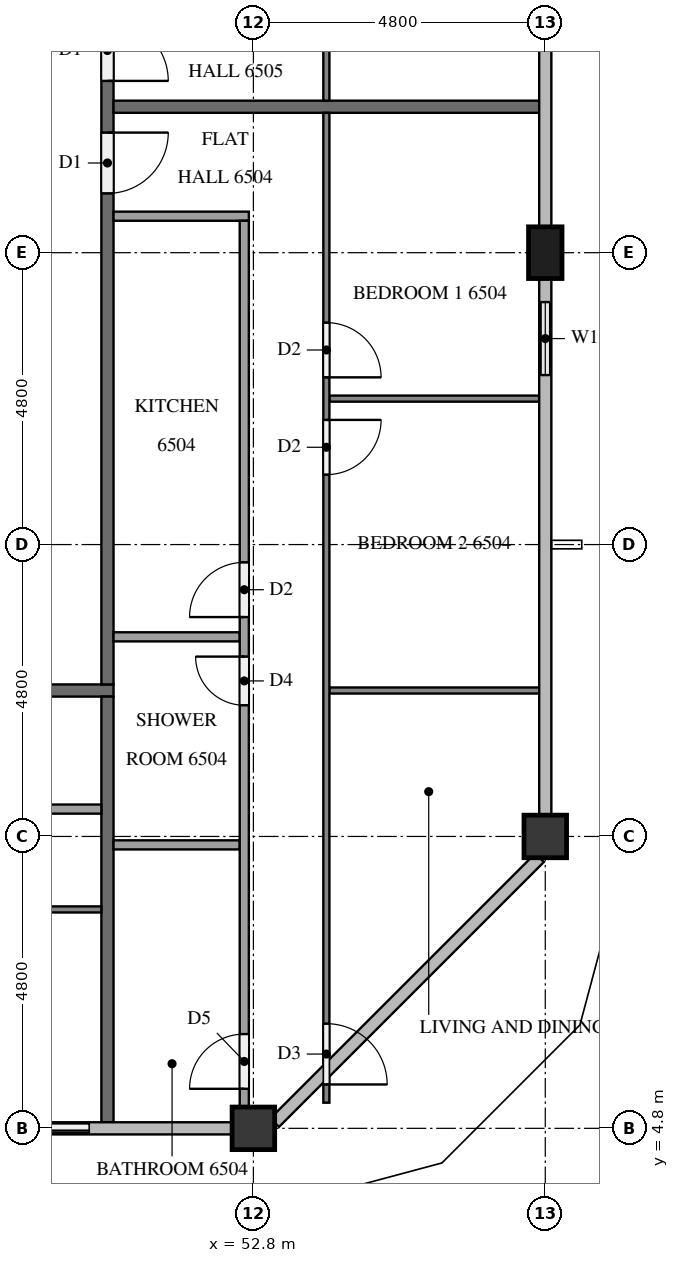
"""IFC4 building model, lengths in metres.
Left out: names, types, materials, properties, quantities, classifications, styles, units other than length and angle.
Written with IfcOpenShell. Run it as: python <this file> out.ifc"""

import sys

from ifc_helpers import new_model, si_unit, direction, frame, frame_2d, origin, origin_2d, place, context, subcontext, project, spatial, rectangle, extrude, element, fill, save


model = new_model("IFC4")
c1 = context("Model", 3, precision=1e-05, world=origin(), true_north=direction((0.0, 1.0)))
c2 = subcontext(c1, "Body", "Model", "MODEL_VIEW")
j1 = project(units=[si_unit("LENGTHUNIT", "METRE"), si_unit("PLANEANGLEUNIT", "RADIAN")], contexts=[c1])
p1 = place(None, origin())
s1 = spatial("IfcSite", under=j1, at=p1, CompositionType="ELEMENT")
p2 = place(p1, origin())
s2 = spatial("IfcBuilding", under=s1, at=p2, CompositionType="ELEMENT")
p3 = place(p2, frame((0.0, 0.0, 249.2)))
s3 = spatial("IfcBuildingStorey", under=s2, at=p3, CompositionType="ELEMENT", Elevation=249.2)
for number, where, z_axis, x_axis in (
    (1, (52.8, 4.8, 0.0), (0.0, 0.0, 1.0), (1.0, 0.0, 0.0)),
    (2, (57.6, 9.6, 0.0), (0.0, 0.0, 1.0), (1.0, 0.0, 0.0)),
):
    element("IfcColumn", number, at=place(p3, frame(where, z_axis=z_axis, x_axis=x_axis)), inside=s3, PredefinedType="COLUMN", context=c2, shape_type="SweptSolid", body=[
        extrude(rectangle(XDim=0.7, YDim=0.7, at=origin_2d()), origin(), (0.0, 0.0, 1.0), 3.2),
    ])
p4 = place(p3, frame((57.6, 19.2, 0.0), z_axis=(0.0, 0.0, 1.0), x_axis=(0.0, 1.0, 0.0)))
e3 = element("IfcColumn", 3, at=p4, inside=s3, PredefinedType="COLUMN", context=c2, shape_type="SweptSolid", body=[
    extrude(rectangle(XDim=0.85, YDim=0.55, at=origin_2d()), origin(), (0.0, 0.0, 1.0), 3.2),
])
p5 = place(p3, frame((48.0, 4.8, 0.0), z_axis=(0.0, 0.0, 1.0), x_axis=(1.0, 0.0, 0.0)))
e4 = element("IfcWall", 4, at=p5, inside=s3, PredefinedType="SOLIDWALL", context=c2, shape_type="SweptSolid", body=[
    extrude(rectangle(XDim=2.4, YDim=0.15, at=frame_2d((1.2, 0.0))), origin(), (0.0, 0.0, 1.0), 3.2),
])
p6 = place(p5, frame((0.3, 0.0, 0.0)))
e5 = element("IfcOpeningElement", 5, at=p6, cuts=e4, PredefinedType="OPENING", context=c2, shape_type="SweptSolid", body=[
    extrude(rectangle(XDim=1.8, YDim=2.4, at=frame_2d((0.9, 1.2))), frame((0.0, 0.085, 0.0), z_axis=(0.0, -1.0, 0.0), x_axis=(1.0, 0.0, 0.0)), (0.0, 0.0, 1.0), 0.17),
])
p7 = place(p3, frame((57.6, 16.8, 0.0), z_axis=(0.0, 0.0, 1.0), x_axis=(0.0, 1.0, 0.0)))
e6 = element("IfcWall", 6, at=p7, inside=s3, PredefinedType="SOLIDWALL", context=c2, shape_type="SweptSolid", body=[
    extrude(rectangle(XDim=1.975, YDim=0.15, at=frame_2d((0.987, 0.0))), origin(), (0.0, 0.0, 1.0), 3.2),
])
p8 = place(p7, frame((0.387, 0.0, 0.9)))
e7 = element("IfcOpeningElement", 7, at=p8, cuts=e6, PredefinedType="OPENING", context=c2, shape_type="SweptSolid", body=[
    extrude(rectangle(XDim=1.2, YDim=1.4, at=frame_2d((0.6, 0.7))), frame((0.0, 0.085, 0.0), z_axis=(0.0, -1.0, 0.0), x_axis=(1.0, 0.0, 0.0)), (0.0, 0.0, 1.0), 0.17),
])
p9 = place(p3, frame((50.5, 12.0, 0.0), z_axis=(0.0, 0.0, 1.0), x_axis=(-1.0, 0.0, 0.0)))
e8 = element("IfcWall", 8, at=p9, inside=s3, PredefinedType="PARTITIONING", context=c2, shape_type="SweptSolid", body=[
    extrude(rectangle(XDim=38.6, YDim=0.2, at=frame_2d((19.3, 0.0))), origin(), (0.0, 0.0, 1.0), 3.2),
])
p10 = place(p9, frame((37.075, 0.0, 0.0)))
e9 = element("IfcOpeningElement", 9, at=p10, cuts=e8, PredefinedType="OPENING", context=c2, shape_type="SweptSolid", body=[
    extrude(rectangle(XDim=1.0, YDim=2.1, at=frame_2d((0.5, 1.05))), frame((0.0, 0.11, 0.0), z_axis=(0.0, -1.0, 0.0), x_axis=(1.0, 0.0, 0.0)), (0.0, 0.0, 1.0), 0.22),
])
p11 = place(p9, frame((12.525, 0.0, 0.0)))
e10 = element("IfcOpeningElement", 10, at=p11, cuts=e8, PredefinedType="OPENING", context=c2, shape_type="SweptSolid", body=[
    extrude(rectangle(XDim=1.0, YDim=2.1, at=frame_2d((0.5, 1.05))), frame((0.0, 0.11, 0.0), z_axis=(0.0, -1.0, 0.0), x_axis=(1.0, 0.0, 0.0)), (0.0, 0.0, 1.0), 0.22),
])
p12 = place(p9, frame((10.675, 0.0, 0.0)))
e11 = element("IfcOpeningElement", 11, at=p12, cuts=e8, PredefinedType="OPENING", context=c2, shape_type="SweptSolid", body=[
    extrude(rectangle(XDim=1.0, YDim=2.1, at=frame_2d((0.5, 1.05))), frame((0.0, 0.11, 0.0), z_axis=(0.0, -1.0, 0.0), x_axis=(1.0, 0.0, 0.0)), (0.0, 0.0, 1.0), 0.22),
])
p13 = place(p3, frame((50.4, 40.7, 0.0), z_axis=(0.0, 0.0, 1.0), x_axis=(0.0, -1.0, 0.0)))
e12 = element("IfcWall", 12, at=p13, inside=s3, PredefinedType="PARTITIONING", context=c2, shape_type="SweptSolid", body=[
    extrude(rectangle(XDim=28.6, YDim=0.2, at=frame_2d((14.3, 0.0))), origin(), (0.0, 0.0, 1.0), 3.2),
])
p14 = place(p13, frame((19.525, 0.0, 0.0)))
e13 = element("IfcOpeningElement", 13, at=p14, cuts=e12, PredefinedType="OPENING", context=c2, shape_type="SweptSolid", body=[
    extrude(rectangle(XDim=1.0, YDim=2.1, at=frame_2d((0.5, 1.05))), frame((0.0, 0.11, 0.0), z_axis=(0.0, -1.0, 0.0), x_axis=(1.0, 0.0, 0.0)), (0.0, 0.0, 1.0), 0.22),
])
p15 = place(p13, frame((17.675, 0.0, 0.0)))
e14 = element("IfcOpeningElement", 14, at=p15, cuts=e12, PredefinedType="OPENING", context=c2, shape_type="SweptSolid", body=[
    extrude(rectangle(XDim=1.0, YDim=2.1, at=frame_2d((0.5, 1.05))), frame((0.0, 0.11, 0.0), z_axis=(0.0, -1.0, 0.0), x_axis=(1.0, 0.0, 0.0)), (0.0, 0.0, 1.0), 0.22),
])
p16 = place(p13, frame((0.325, 0.0, 0.0)))
e15 = element("IfcOpeningElement", 15, at=p16, cuts=e12, PredefinedType="OPENING", context=c2, shape_type="SweptSolid", body=[
    extrude(rectangle(XDim=1.0, YDim=2.1, at=frame_2d((0.5, 1.05))), frame((0.0, 0.11, 0.0), z_axis=(0.0, -1.0, 0.0), x_axis=(1.0, 0.0, 0.0)), (0.0, 0.0, 1.0), 0.22),
])
for number, where, z_axis, x_axis in (
    (16, (50.4, 11.9, 0.0), (0.0, 0.0, 1.0), (0.0, -1.0, 0.0)),
    (17, (50.5, 21.6, 0.0), (0.0, 0.0, 1.0), (1.0, 0.0, 0.0)),
):
    element("IfcWall", number, at=place(p3, frame(where, z_axis=z_axis, x_axis=x_axis)), inside=s3, PredefinedType="PARTITIONING", context=c2, shape_type="SweptSolid", body=[
        extrude(rectangle(XDim=7.0, YDim=0.2, at=frame_2d((3.5, 0.0))), origin(), (0.0, 0.0, 1.0), 3.2),
    ])
p17 = place(p3, frame((50.3, 8.4, 0.0), z_axis=(0.0, 0.0, 1.0), x_axis=(-1.0, 0.0, 0.0)))
e18 = element("IfcWall", 18, at=p17, inside=s3, PredefinedType="PARTITIONING", context=c2, shape_type="SweptSolid", body=[
    extrude(rectangle(XDim=11.8, YDim=0.1, at=frame_2d((5.9, 0.0))), origin(), (0.0, 0.0, 1.0), 3.2),
])
p18 = place(p17, frame((7.45, 0.0, 0.0)))
e19 = element("IfcOpeningElement", 19, at=p18, cuts=e18, PredefinedType="OPENING", context=c2, shape_type="SweptSolid", body=[
    extrude(rectangle(XDim=0.9, YDim=2.1, at=frame_2d((0.45, 1.05))), frame((0.0, 0.06, 0.0), z_axis=(0.0, -1.0, 0.0), x_axis=(1.0, 0.0, 0.0)), (0.0, 0.0, 1.0), 0.12),
])
p19 = place(p17, frame((5.75, 0.0, 0.0)))
e20 = element("IfcOpeningElement", 20, at=p19, cuts=e18, PredefinedType="OPENING", context=c2, shape_type="SweptSolid", body=[
    extrude(rectangle(XDim=1.0, YDim=2.1, at=frame_2d((0.5, 1.05))), frame((0.0, 0.06, 0.0), z_axis=(0.0, -1.0, 0.0), x_axis=(1.0, 0.0, 0.0)), (0.0, 0.0, 1.0), 0.12),
])
p20 = place(p3, frame((40.275, 10.05, 0.0), z_axis=(0.0, 0.0, 1.0), x_axis=(1.0, 0.0, 0.0)))
e21 = element("IfcWall", 21, at=p20, inside=s3, PredefinedType="PARTITIONING", context=c2, shape_type="SweptSolid", body=[
    extrude(rectangle(XDim=10.025, YDim=0.15, at=frame_2d((5.013, 0.0))), origin(), (0.0, 0.0, 1.0), 3.2),
])
p21 = place(p20, frame((2.885, 0.0, 0.0)))
e22 = element("IfcOpeningElement", 22, at=p21, cuts=e21, PredefinedType="OPENING", context=c2, shape_type="SweptSolid", body=[
    extrude(rectangle(XDim=0.8, YDim=2.1, at=frame_2d((0.4, 1.05))), frame((0.0, 0.085, 0.0), z_axis=(0.0, -1.0, 0.0), x_axis=(1.0, 0.0, 0.0)), (0.0, 0.0, 1.0), 0.17),
])
p22 = place(p20, frame((4.335, 0.0, 0.0)))
e23 = element("IfcOpeningElement", 23, at=p22, cuts=e21, PredefinedType="OPENING", context=c2, shape_type="SweptSolid", body=[
    extrude(rectangle(XDim=0.9, YDim=2.1, at=frame_2d((0.45, 1.05))), frame((0.0, 0.085, 0.0), z_axis=(0.0, -1.0, 0.0), x_axis=(1.0, 0.0, 0.0)), (0.0, 0.0, 1.0), 0.17),
])
for number, where, z_axis, x_axis in (
    (24, (54.05, 16.8, 0.0), (0.0, 0.0, 1.0), (1.0, 0.0, 0.0)),
    (25, (54.05, 12.0, 0.0), (0.0, 0.0, 1.0), (1.0, 0.0, 0.0)),
):
    element("IfcWall", number, at=place(p3, frame(where, z_axis=z_axis, x_axis=x_axis)), inside=s3, PredefinedType="PARTITIONING", context=c2, shape_type="SweptSolid", body=[
        extrude(rectangle(XDim=3.45, YDim=0.1, at=frame_2d((1.725, 0.0))), origin(), (0.0, 0.0, 1.0), 3.2),
    ])
p23 = place(p3, frame((54.0, 21.5, 0.0), z_axis=(0.0, 0.0, 1.0), x_axis=(0.0, -1.0, 0.0)))
e26 = element("IfcWall", 26, at=p23, inside=s3, PredefinedType="PARTITIONING", context=c2, shape_type="SweptSolid", body=[
    extrude(rectangle(XDim=16.279, YDim=0.1, at=frame_2d((8.139, 0.0))), origin(), (0.0, 0.0, 1.0), 3.2),
])
p24 = place(p23, frame((3.45, 0.0, 0.0)))
e27 = element("IfcOpeningElement", 27, at=p24, cuts=e26, PredefinedType="OPENING", context=c2, shape_type="SweptSolid", body=[
    extrude(rectangle(XDim=0.9, YDim=2.1, at=frame_2d((0.45, 1.05))), frame((0.0, 0.06, 0.0), z_axis=(0.0, -1.0, 0.0), x_axis=(1.0, 0.0, 0.0)), (0.0, 0.0, 1.0), 0.12),
])
p25 = place(p23, frame((5.05, 0.0, 0.0)))
e28 = element("IfcOpeningElement", 28, at=p25, cuts=e26, PredefinedType="OPENING", context=c2, shape_type="SweptSolid", body=[
    extrude(rectangle(XDim=0.9, YDim=2.1, at=frame_2d((0.45, 1.05))), frame((0.0, 0.06, 0.0), z_axis=(0.0, -1.0, 0.0), x_axis=(1.0, 0.0, 0.0)), (0.0, 0.0, 1.0), 0.12),
])
p26 = place(p23, frame((14.979, 0.0, 0.0)))
e29 = element("IfcOpeningElement", 29, at=p26, cuts=e26, PredefinedType="OPENING", context=c2, shape_type="SweptSolid", body=[
    extrude(rectangle(XDim=1.0, YDim=2.1, at=frame_2d((0.5, 1.05))), frame((0.0, 0.06, 0.0), z_axis=(0.0, -1.0, 0.0), x_axis=(1.0, 0.0, 0.0)), (0.0, 0.0, 1.0), 0.12),
])
for number, where, z_axis, x_axis in (
    (30, (50.5, 12.883, 0.0), (0.0, 0.0, 1.0), (1.0, 0.0, 0.0)),
    (31, (50.5, 9.461, 0.0), (0.0, 0.0, 1.0), (1.0, 0.0, 0.0)),
):
    element("IfcWall", number, at=place(p3, frame(where, z_axis=z_axis, x_axis=x_axis)), inside=s3, PredefinedType="PARTITIONING", context=c2, shape_type="SweptSolid", body=[
        extrude(rectangle(XDim=2.075, YDim=0.15, at=frame_2d((1.038, 0.0))), origin(), (0.0, 0.0, 1.0), 3.2),
    ])
p27 = place(p3, frame((50.5, 19.8, 0.0), z_axis=(0.0, 0.0, 1.0), x_axis=(1.0, 0.0, 0.0)))
e32 = element("IfcWall", 32, at=p27, inside=s3, PredefinedType="PARTITIONING", context=c2, shape_type="SweptSolid", body=[
    extrude(rectangle(XDim=2.225, YDim=0.15, at=frame_2d((1.113, 0.0))), origin(), (0.0, 0.0, 1.0), 3.2),
])
p28 = place(p3, frame((52.65, 5.15, 0.0), z_axis=(0.0, 0.0, 1.0), x_axis=(0.0, 1.0, 0.0)))
e33 = element("IfcWall", 33, at=p28, inside=s3, PredefinedType="PARTITIONING", context=c2, shape_type="SweptSolid", body=[
    extrude(rectangle(XDim=14.575, YDim=0.15, at=frame_2d((7.288, 0.0))), origin(), (0.0, 0.0, 1.0), 3.2),
])
p29 = place(p28, frame((8.058, 0.0, 0.0)))
e34 = element("IfcOpeningElement", 34, at=p29, cuts=e33, PredefinedType="OPENING", context=c2, shape_type="SweptSolid", body=[
    extrude(rectangle(XDim=0.9, YDim=2.1, at=frame_2d((0.45, 1.05))), frame((0.0, 0.085, 0.0), z_axis=(0.0, -1.0, 0.0), x_axis=(1.0, 0.0, 0.0)), (0.0, 0.0, 1.0), 0.17),
])
p30 = place(p28, frame((6.608, 0.0, 0.0)))
e35 = element("IfcOpeningElement", 35, at=p30, cuts=e33, PredefinedType="OPENING", context=c2, shape_type="SweptSolid", body=[
    extrude(rectangle(XDim=0.8, YDim=2.1, at=frame_2d((0.4, 1.05))), frame((0.0, 0.085, 0.0), z_axis=(0.0, -1.0, 0.0), x_axis=(1.0, 0.0, 0.0)), (0.0, 0.0, 1.0), 0.17),
])
p31 = place(p28, frame((0.3, 0.0, 0.0)))
e36 = element("IfcOpeningElement", 36, at=p31, cuts=e33, PredefinedType="OPENING", context=c2, shape_type="SweptSolid", body=[
    extrude(rectangle(XDim=0.9, YDim=2.1, at=frame_2d((0.45, 1.05))), frame((0.0, 0.085, 0.0), z_axis=(0.0, -1.0, 0.0), x_axis=(1.0, 0.0, 0.0)), (0.0, 0.0, 1.0), 0.17),
])
p32 = place(p3, frame((54.0, 31.1, 0.0), z_axis=(0.0, 0.0, 1.0), x_axis=(0.0, -1.0, 0.0)))
e37 = element("IfcWall", 37, at=p32, inside=s3, PredefinedType="PARTITIONING", context=c2, shape_type="SweptSolid", body=[
    extrude(rectangle(XDim=9.4, YDim=0.1, at=frame_2d((4.7, 0.0))), origin(), (0.0, 0.0, 1.0), 3.2),
])
p33 = place(p32, frame((5.05, 0.0, 0.0)))
e38 = element("IfcOpeningElement", 38, at=p33, cuts=e37, PredefinedType="OPENING", context=c2, shape_type="SweptSolid", body=[
    extrude(rectangle(XDim=1.0, YDim=2.1, at=frame_2d((0.5, 1.05))), frame((0.0, 0.06, 0.0), z_axis=(0.0, -1.0, 0.0), x_axis=(1.0, 0.0, 0.0)), (0.0, 0.0, 1.0), 0.12),
])
p34 = place(p32, frame((3.45, 0.0, 0.0)))
e39 = element("IfcOpeningElement", 39, at=p34, cuts=e37, PredefinedType="OPENING", context=c2, shape_type="SweptSolid", body=[
    extrude(rectangle(XDim=0.9, YDim=2.1, at=frame_2d((0.45, 1.05))), frame((0.0, 0.06, 0.0), z_axis=(0.0, -1.0, 0.0), x_axis=(1.0, 0.0, 0.0)), (0.0, 0.0, 1.0), 0.12),
])
p35 = place(p6, origin())
e40 = element("IfcDoor", 40, at=p35, inside=s3, OperationType="SLIDING_TO_RIGHT", PredefinedType="DOOR", context=c2, shape_type="SweptSolid", body=[
    extrude(rectangle(XDim=1.8, YDim=2.4, at=frame_2d((0.9, 1.2))), frame((0.0, 0.025, 0.0), z_axis=(0.0, -1.0, 0.0), x_axis=(1.0, 0.0, 0.0)), (0.0, 0.0, 1.0), 0.05),
])
fill(e5, e40)
p36 = place(p8, origin())
e41 = element("IfcWindow", 41, at=p36, inside=s3, PartitioningType="SINGLE_PANEL", PredefinedType="WINDOW", context=c2, shape_type="SweptSolid", body=[
    extrude(rectangle(XDim=1.2, YDim=1.4, at=frame_2d((0.6, 0.7))), frame((0.0, 0.03, 0.0), z_axis=(0.0, -1.0, 0.0), x_axis=(1.0, 0.0, 0.0)), (0.0, 0.0, 1.0), 0.06),
])
fill(e7, e41)
p37 = place(p14, origin())
e42 = element("IfcDoor", 42, at=p37, inside=s3, OperationType="SINGLE_SWING_LEFT", PredefinedType="DOOR", context=c2, shape_type="SweptSolid", body=[
    extrude(rectangle(XDim=1.0, YDim=2.1, at=frame_2d((0.5, 1.05))), frame((0.0, 0.025, 0.0), z_axis=(0.0, -1.0, 0.0), x_axis=(1.0, 0.0, 0.0)), (0.0, 0.0, 1.0), 0.05),
])
fill(e13, e42)
p38 = place(p15, origin())
e43 = element("IfcDoor", 43, at=p38, inside=s3, OperationType="SINGLE_SWING_RIGHT", PredefinedType="DOOR", context=c2, shape_type="SweptSolid", body=[
    extrude(rectangle(XDim=1.0, YDim=2.1, at=frame_2d((0.5, 1.05))), frame((0.0, 0.025, 0.0), z_axis=(0.0, -1.0, 0.0), x_axis=(1.0, 0.0, 0.0)), (0.0, 0.0, 1.0), 0.05),
])
fill(e14, e43)
p39 = place(p24, origin())
e44 = element("IfcDoor", 44, at=p39, inside=s3, OperationType="SINGLE_SWING_RIGHT", PredefinedType="DOOR", context=c2, shape_type="SweptSolid", body=[
    extrude(rectangle(XDim=0.9, YDim=2.1, at=frame_2d((0.45, 1.05))), frame((0.0, 0.025, 0.0), z_axis=(0.0, -1.0, 0.0), x_axis=(1.0, 0.0, 0.0)), (0.0, 0.0, 1.0), 0.05),
])
fill(e27, e44)
p40 = place(p25, origin())
e45 = element("IfcDoor", 45, at=p40, inside=s3, OperationType="SINGLE_SWING_LEFT", PredefinedType="DOOR", context=c2, shape_type="SweptSolid", body=[
    extrude(rectangle(XDim=0.9, YDim=2.1, at=frame_2d((0.45, 1.05))), frame((0.0, 0.025, 0.0), z_axis=(0.0, -1.0, 0.0), x_axis=(1.0, 0.0, 0.0)), (0.0, 0.0, 1.0), 0.05),
])
fill(e28, e45)
p41 = place(p26, origin())
e46 = element("IfcDoor", 46, at=p41, inside=s3, OperationType="SINGLE_SWING_RIGHT", PredefinedType="DOOR", context=c2, shape_type="SweptSolid", body=[
    extrude(rectangle(XDim=1.0, YDim=2.1, at=frame_2d((0.5, 1.05))), frame((0.0, 0.025, 0.0), z_axis=(0.0, -1.0, 0.0), x_axis=(1.0, 0.0, 0.0)), (0.0, 0.0, 1.0), 0.05),
])
fill(e29, e46)
p42 = place(p29, origin())
e47 = element("IfcDoor", 47, at=p42, inside=s3, OperationType="SINGLE_SWING_LEFT", PredefinedType="DOOR", context=c2, shape_type="SweptSolid", body=[
    extrude(rectangle(XDim=0.9, YDim=2.1, at=frame_2d((0.45, 1.05))), frame((0.0, 0.025, 0.0), z_axis=(0.0, -1.0, 0.0), x_axis=(1.0, 0.0, 0.0)), (0.0, 0.0, 1.0), 0.05),
])
fill(e34, e47)
p43 = place(p30, origin())
e48 = element("IfcDoor", 48, at=p43, inside=s3, OperationType="SINGLE_SWING_RIGHT", PredefinedType="DOOR", context=c2, shape_type="SweptSolid", body=[
    extrude(rectangle(XDim=0.8, YDim=2.1, at=frame_2d((0.4, 1.05))), frame((0.0, 0.025, 0.0), z_axis=(0.0, -1.0, 0.0), x_axis=(1.0, 0.0, 0.0)), (0.0, 0.0, 1.0), 0.05),
])
fill(e35, e48)
p44 = place(p31, origin())
e49 = element("IfcDoor", 49, at=p44, inside=s3, OperationType="SINGLE_SWING_LEFT", PredefinedType="DOOR", context=c2, shape_type="SweptSolid", body=[
    extrude(rectangle(XDim=0.9, YDim=2.1, at=frame_2d((0.45, 1.05))), frame((0.0, 0.025, 0.0), z_axis=(0.0, -1.0, 0.0), x_axis=(1.0, 0.0, 0.0)), (0.0, 0.0, 1.0), 0.05),
])
fill(e36, e49)
save(model, sys.argv[1])
